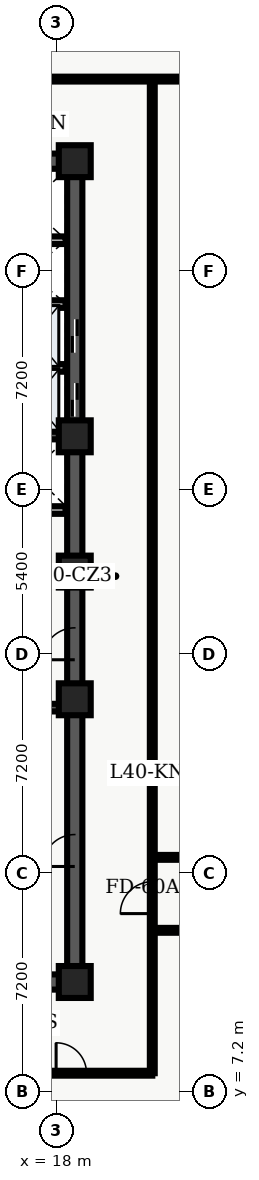
"""IFC4 building model, lengths in metres.
Left out: names, types, materials, properties, quantities, classifications, styles, units other than length and angle.
Written with IfcOpenShell. Run it as: python <this file> out.ifc"""

import sys

from ifc_helpers import new_model, entity, si_unit, converted_unit, direction, frame, origin_with_axes, origin_2d_with_axis, place, context, subcontext, project, spatial, polyline, rectangle, outline, extrude, element, fill, save


model = new_model("IFC4")
c1 = context("Model", 3, precision=1e-05, world=origin_with_axes(), true_north=direction((0.0, 1.0)))
c2 = subcontext(c1, "Body", "Model", "MODEL_VIEW")
j1 = project(units=[si_unit("LENGTHUNIT", "METRE"), converted_unit("PLANEANGLEUNIT", "DEGREE", entity("IfcPlaneAngleMeasure", 0.017), si_unit("PLANEANGLEUNIT", "RADIAN"), dimensions=[0, 0, 0, 0, 0, 0, 0])], contexts=[c1])
p1 = place(None, origin_with_axes())
s1 = spatial("IfcSite", under=j1, at=p1, CompositionType="ELEMENT")
p2 = place(p1, origin_with_axes())
s2 = spatial("IfcBuilding", under=s1, at=p2, CompositionType="ELEMENT")
p3 = place(p2, frame((0.0, 0.0, 164.1), z_axis=(0.0, 0.0, 1.0), x_axis=(1.0, 0.0, 0.0)))
s3 = spatial("IfcBuildingStorey", under=s2, at=p3, CompositionType="ELEMENT", Elevation=164.1)
p4 = place(p3, frame((11.4, 10.8, 0.0), z_axis=(0.0, 0.0, 1.0), x_axis=(1.0, 0.0, 0.0)))
e1 = element("IfcWall", 1, at=p4, inside=s3, PredefinedType="SHEAR", context=c2, shape_type="SweptSolid", body=[
    extrude(outline(polyline([(0.0, -0.25), (7.2, -0.25), (7.2, 0.25), (0.0, 0.25), (0.0, -0.25)])), origin_with_axes(), (0.0, 0.0, 1.0), 3.66),
])
p5 = place(p4, frame((2.625, 0.0, 0.0), z_axis=(0.0, 0.0, 1.0), x_axis=(1.0, 0.0, 0.0)))
e2 = element("IfcOpeningElement", 2, at=p5, cuts=e1, PredefinedType="OPENING", context=c2, shape_type="SweptSolid", body=[
    extrude(rectangle(XDim=1.05, YDim=0.52, at=origin_2d_with_axis()), origin_with_axes(), (0.0, 0.0, 1.0), 2.15),
])
p6 = place(p3, frame((11.4, 37.8, 0.0), z_axis=(0.0, 0.0, 1.0), x_axis=(1.0, 0.0, 0.0)))
e3 = element("IfcWall", 3, at=p6, inside=s3, PredefinedType="SHEAR", context=c2, shape_type="SweptSolid", body=[
    extrude(outline(polyline([(0.0, -0.25), (7.2, -0.25), (7.2, 0.25), (0.0, 0.25), (0.0, -0.25)])), origin_with_axes(), (0.0, 0.0, 1.0), 3.66),
])
p7 = place(p6, frame((2.625, 0.0, 0.0), z_axis=(0.0, 0.0, 1.0), x_axis=(1.0, 0.0, 0.0)))
e4 = element("IfcOpeningElement", 4, at=p7, cuts=e3, PredefinedType="OPENING", context=c2, shape_type="SweptSolid", body=[
    extrude(rectangle(XDim=1.05, YDim=0.52, at=origin_2d_with_axis()), origin_with_axes(), (0.0, 0.0, 1.0), 2.15),
])
p8 = place(p3, frame((18.6, 10.8, 0.0), z_axis=(0.0, 0.0, 1.0), x_axis=(0.0, 1.0, 0.0)))
e5 = element("IfcWall", 5, at=p8, inside=s3, PredefinedType="SHEAR", context=c2, shape_type="SweptSolid", body=[
    extrude(outline(polyline([(0.0, -0.25), (13.5, -0.25), (13.5, 0.25), (0.0, 0.25), (0.0, -0.25)])), origin_with_axes(), (0.0, 0.0, 1.0), 3.66),
])
p9 = place(p8, frame((11.125, 0.0, 0.0), z_axis=(0.0, 0.0, 1.0), x_axis=(1.0, 0.0, 0.0)))
e6 = element("IfcOpeningElement", 6, at=p9, cuts=e5, PredefinedType="OPENING", context=c2, shape_type="SweptSolid", body=[
    extrude(rectangle(XDim=1.05, YDim=0.52, at=origin_2d_with_axis()), origin_with_axes(), (0.0, 0.0, 1.0), 2.15),
])
p10 = place(p8, frame((4.325, 0.0, 0.0), z_axis=(0.0, 0.0, 1.0), x_axis=(1.0, 0.0, 0.0)))
e7 = element("IfcOpeningElement", 7, at=p10, cuts=e5, PredefinedType="OPENING", context=c2, shape_type="SweptSolid", body=[
    extrude(rectangle(XDim=1.05, YDim=0.52, at=origin_2d_with_axis()), origin_with_axes(), (0.0, 0.0, 1.0), 2.15),
])
p11 = place(p3, frame((18.6, 24.3, 0.0), z_axis=(0.0, 0.0, 1.0), x_axis=(0.0, 1.0, 0.0)))
e8 = element("IfcWall", 8, at=p11, inside=s3, PredefinedType="SHEAR", context=c2, shape_type="SweptSolid", body=[
    extrude(outline(polyline([(0.0, -0.25), (13.5, -0.25), (13.5, 0.25), (0.0, 0.25), (0.0, -0.25)])), origin_with_axes(), (0.0, 0.0, 1.0), 3.66),
])
p12 = place(p11, frame((5.65, 0.0, 0.0), z_axis=(0.0, 0.0, 1.0), x_axis=(1.0, 0.0, 0.0)))
e9 = element("IfcOpeningElement", 9, at=p12, cuts=e8, PredefinedType="OPENING", context=c2, shape_type="SweptSolid", body=[
    extrude(rectangle(XDim=1.1, YDim=0.52, at=origin_2d_with_axis()), origin_with_axes(), (0.0, 0.0, 1.0), 2.15),
])
p13 = place(p11, frame((7.75, 0.0, 0.0), z_axis=(0.0, 0.0, 1.0), x_axis=(1.0, 0.0, 0.0)))
e10 = element("IfcOpeningElement", 10, at=p13, cuts=e8, PredefinedType="OPENING", context=c2, shape_type="SweptSolid", body=[
    extrude(rectangle(XDim=1.1, YDim=0.52, at=origin_2d_with_axis()), origin_with_axes(), (0.0, 0.0, 1.0), 2.15),
])
for number, where, z_axis, x_axis in (
    (11, (11.65, 19.825, 0.0), (0.0, 0.0, 1.0), (1.0, 0.0, 0.0)),
    (12, (11.65, 28.775, 0.0), (0.0, 0.0, 1.0), (1.0, 0.0, 0.0)),
):
    element("IfcWall", number, at=place(p3, frame(where, z_axis=z_axis, x_axis=x_axis)), inside=s3, PredefinedType="SHEAR", context=c2, shape_type="SweptSolid", body=[
        extrude(outline(polyline([(0.0, -0.125), (6.7, -0.125), (6.7, 0.125), (0.0, 0.125), (0.0, -0.125)])), origin_with_axes(), (0.0, 0.0, 1.0), 3.66),
    ])
p14 = place(p3, frame((11.7, 24.1, 0.0), z_axis=(0.0, 0.0, 1.0), x_axis=(1.0, 0.0, 0.0)))
e13 = element("IfcWall", 13, at=p14, inside=s3, PredefinedType="SOLIDWALL", context=c2, shape_type="SweptSolid", body=[
    extrude(outline(polyline([(0.0, -0.125), (6.6, -0.125), (6.6, 0.125), (0.0, 0.125), (0.0, -0.125)])), origin_with_axes(), (0.0, 0.0, 1.0), 2.7),
])
p15 = place(p14, frame((3.75, 0.0, 0.0), z_axis=(0.0, 0.0, 1.0), x_axis=(1.0, 0.0, 0.0)))
e14 = element("IfcOpeningElement", 14, at=p15, cuts=e13, PredefinedType="OPENING", context=c2, shape_type="SweptSolid", body=[
    extrude(rectangle(XDim=0.9, YDim=0.27, at=origin_2d_with_axis()), origin_with_axes(), (0.0, 0.0, 1.0), 2.15),
])
p16 = place(p3, frame((11.7, 26.325, 0.0), z_axis=(0.0, 0.0, 1.0), x_axis=(1.0, 0.0, 0.0)))
e15 = element("IfcWall", 15, at=p16, inside=s3, PredefinedType="SOLIDWALL", context=c2, shape_type="SweptSolid", body=[
    extrude(outline(polyline([(0.0, -0.125), (6.6, -0.125), (6.6, 0.125), (0.0, 0.125), (0.0, -0.125)])), origin_with_axes(), (0.0, 0.0, 1.0), 2.7),
])
p17 = place(p16, frame((3.5, 0.0, 0.0), z_axis=(0.0, 0.0, 1.0), x_axis=(1.0, 0.0, 0.0)))
e16 = element("IfcOpeningElement", 16, at=p17, cuts=e15, PredefinedType="OPENING", context=c2, shape_type="SweptSolid", body=[
    extrude(rectangle(XDim=0.9, YDim=0.27, at=origin_2d_with_axis()), origin_with_axes(), (0.0, 0.0, 1.0), 2.15),
])
for number, where, z_axis, x_axis in (
    (17, (18.6, 10.8, 0.0), (0.0, 0.0, 1.0), (1.0, 0.0, 0.0)),
    (18, (18.6, 20.1, 0.0), (0.0, 0.0, 1.0), (1.0, 0.0, 0.0)),
    (19, (18.6, 24.3, 0.0), (0.0, 0.0, 1.0), (1.0, 0.0, 0.0)),
    (20, (18.6, 28.75, 0.0), (0.0, 0.0, 1.0), (1.0, 0.0, 0.0)),
    (21, (18.6, 37.8, 0.0), (0.0, 0.0, 1.0), (1.0, 0.0, 0.0)),
):
    element("IfcColumn", number, at=place(p3, frame(where, z_axis=z_axis, x_axis=x_axis)), inside=s3, PredefinedType="COLUMN", context=c2, shape_type="SweptSolid", body=[
        extrude(rectangle(XDim=1.05, YDim=1.05, at=origin_2d_with_axis()), origin_with_axes(), (0.0, 0.0, 1.0), 3.9),
    ])
for number, where, z_axis, x_axis in (
    (22, (15.84, 31.0, 0.0), (0.0, 0.0, 1.0), (1.0, 0.0, 0.0)),
    (23, (15.84, 33.1, 0.0), (0.0, 0.0, 1.0), (1.0, 0.0, 0.0)),
    (24, (15.84, 35.2, 0.0), (0.0, 0.0, 1.0), (1.0, 0.0, 0.0)),
):
    element("IfcWall", number, at=place(p3, frame(where, z_axis=z_axis, x_axis=x_axis)), inside=s3, PredefinedType="SOLIDWALL", context=c2, shape_type="SweptSolid", body=[
        extrude(outline(polyline([(0.0, -0.125), (2.46, -0.125), (2.46, 0.125), (0.0, 0.125), (0.0, -0.125)])), origin_with_axes(), (0.0, 0.0, 1.0), 2.7),
    ])
p18 = place(p3, frame((2.6, 7.8, 0.0), z_axis=(0.0, 0.0, 1.0), x_axis=(1.0, 0.0, 0.0)))
e25 = element("IfcWall", 25, at=p18, inside=s3, PredefinedType="PARTITIONING", context=c2, shape_type="SweptSolid", body=[
    extrude(outline(polyline([(0.0, -0.08), (18.55, -0.08), (18.55, 0.08), (0.0, 0.08), (0.0, -0.08)])), origin_with_axes(), (0.0, 0.0, 1.0), 2.7),
])
p19 = place(p18, frame((3.215, 0.0, 0.0), z_axis=(0.0, 0.0, 1.0), x_axis=(1.0, 0.0, 0.0)))
e26 = element("IfcOpeningElement", 26, at=p19, cuts=e25, PredefinedType="OPENING", context=c2, shape_type="SweptSolid", body=[
    extrude(rectangle(XDim=1.2, YDim=0.18, at=origin_2d_with_axis()), origin_with_axes(), (0.0, 0.0, 1.0), 2.2),
])
p20 = place(p18, frame((11.107, 0.0, 0.0), z_axis=(0.0, 0.0, 1.0), x_axis=(1.0, 0.0, 0.0)))
e27 = element("IfcOpeningElement", 27, at=p20, cuts=e25, PredefinedType="OPENING", context=c2, shape_type="SweptSolid", body=[
    extrude(rectangle(XDim=1.0, YDim=0.18, at=origin_2d_with_axis()), origin_with_axes(), (0.0, 0.0, 1.0), 2.15),
])
p21 = place(p18, frame((15.886, 0.0, 0.0), z_axis=(0.0, 0.0, 1.0), x_axis=(1.0, 0.0, 0.0)))
e28 = element("IfcOpeningElement", 28, at=p21, cuts=e25, PredefinedType="OPENING", context=c2, shape_type="SweptSolid", body=[
    extrude(rectangle(XDim=1.0, YDim=0.18, at=origin_2d_with_axis()), origin_with_axes(), (0.0, 0.0, 1.0), 2.15),
])
p22 = place(p3, frame((2.6, 40.5, 0.0), z_axis=(0.0, 0.0, 1.0), x_axis=(1.0, 0.0, 0.0)))
e29 = element("IfcWall", 29, at=p22, inside=s3, PredefinedType="PARTITIONING", context=c2, shape_type="SweptSolid", body=[
    extrude(outline(polyline([(0.0, -0.08), (20.884, -0.08), (20.884, 0.08), (0.0, 0.08), (0.0, -0.08)])), origin_with_axes(), (0.0, 0.0, 1.0), 2.7),
])
p23 = place(p22, frame((4.395, 0.0, 0.0), z_axis=(0.0, 0.0, 1.0), x_axis=(1.0, 0.0, 0.0)))
e30 = element("IfcOpeningElement", 30, at=p23, cuts=e29, PredefinedType="OPENING", context=c2, shape_type="SweptSolid", body=[
    extrude(rectangle(XDim=1.2, YDim=0.18, at=origin_2d_with_axis()), origin_with_axes(), (0.0, 0.0, 1.0), 2.2),
])
p24 = place(p22, frame((13.16, 0.0, 0.0), z_axis=(0.0, 0.0, 1.0), x_axis=(1.0, 0.0, 0.0)))
e31 = element("IfcOpeningElement", 31, at=p24, cuts=e29, PredefinedType="OPENING", context=c2, shape_type="SweptSolid", body=[
    extrude(rectangle(XDim=1.0, YDim=0.18, at=origin_2d_with_axis()), origin_with_axes(), (0.0, 0.0, 1.0), 2.15),
])
p25 = place(p3, frame((21.15, 7.8, 0.0), z_axis=(0.0, 0.0, 1.0), x_axis=(0.0, 1.0, 0.0)))
e32 = element("IfcWall", 32, at=p25, inside=s3, PredefinedType="PARTITIONING", context=c2, shape_type="SweptSolid", body=[
    extrude(outline(polyline([(0.0, -0.08), (32.7, -0.08), (32.7, 0.08), (0.0, 0.08), (0.0, -0.08)])), origin_with_axes(), (0.0, 0.0, 1.0), 2.7),
])
p26 = place(p25, frame((5.775, 0.0, 0.0), z_axis=(0.0, 0.0, 1.0), x_axis=(1.0, 0.0, 0.0)))
e33 = element("IfcOpeningElement", 33, at=p26, cuts=e32, PredefinedType="OPENING", context=c2, shape_type="SweptSolid", body=[
    extrude(rectangle(XDim=1.05, YDim=0.18, at=origin_2d_with_axis()), origin_with_axes(), (0.0, 0.0, 1.0), 2.15),
])
p27 = place(p3, frame((21.15, 12.5, 0.0), z_axis=(0.0, 0.0, 1.0), x_axis=(1.0, 0.0, 0.0)))
e34 = element("IfcWall", 34, at=p27, inside=s3, PredefinedType="PARTITIONING", context=c2, shape_type="SweptSolid", body=[
    extrude(outline(polyline([(0.0, -0.08), (15.2, -0.08), (15.2, 0.08), (0.0, 0.08), (0.0, -0.08)])), origin_with_axes(), (0.0, 0.0, 1.0), 2.7),
])
p28 = place(p27, frame((3.583, 0.0, 0.0), z_axis=(0.0, 0.0, 1.0), x_axis=(1.0, 0.0, 0.0)))
e35 = element("IfcOpeningElement", 35, at=p28, cuts=e34, PredefinedType="OPENING", context=c2, shape_type="SweptSolid", body=[
    extrude(rectangle(XDim=1.0, YDim=0.18, at=origin_2d_with_axis()), origin_with_axes(), (0.0, 0.0, 1.0), 2.15),
])
p29 = place(p27, frame((11.053, 0.0, 0.0), z_axis=(0.0, 0.0, 1.0), x_axis=(1.0, 0.0, 0.0)))
e36 = element("IfcOpeningElement", 36, at=p29, cuts=e34, PredefinedType="OPENING", context=c2, shape_type="SweptSolid", body=[
    extrude(rectangle(XDim=1.2, YDim=0.18, at=origin_2d_with_axis()), origin_with_axes(), (0.0, 0.0, 1.0), 2.2),
])
p30 = place(p3, frame((21.15, 14.9, 0.0), z_axis=(0.0, 0.0, 1.0), x_axis=(1.0, 0.0, 0.0)))
e37 = element("IfcWall", 37, at=p30, inside=s3, PredefinedType="PARTITIONING", context=c2, shape_type="SweptSolid", body=[
    extrude(outline(polyline([(0.0, -0.08), (15.2, -0.08), (15.2, 0.08), (0.0, 0.08), (0.0, -0.08)])), origin_with_axes(), (0.0, 0.0, 1.0), 2.7),
])
p31 = place(p30, frame((1.758, 0.0, 0.0), z_axis=(0.0, 0.0, 1.0), x_axis=(1.0, 0.0, 0.0)))
e38 = element("IfcOpeningElement", 38, at=p31, cuts=e37, PredefinedType="OPENING", context=c2, shape_type="SweptSolid", body=[
    extrude(rectangle(XDim=1.0, YDim=0.18, at=origin_2d_with_axis()), origin_with_axes(), (0.0, 0.0, 1.0), 2.15),
])
p32 = place(p30, frame((4.893, 0.0, 0.0), z_axis=(0.0, 0.0, 1.0), x_axis=(1.0, 0.0, 0.0)))
e39 = element("IfcOpeningElement", 39, at=p32, cuts=e37, PredefinedType="OPENING", context=c2, shape_type="SweptSolid", body=[
    extrude(rectangle(XDim=1.0, YDim=0.18, at=origin_2d_with_axis()), origin_with_axes(), (0.0, 0.0, 1.0), 2.15),
])
p33 = place(p30, frame((8.555, 0.0, 0.0), z_axis=(0.0, 0.0, 1.0), x_axis=(1.0, 0.0, 0.0)))
e40 = element("IfcOpeningElement", 40, at=p33, cuts=e37, PredefinedType="OPENING", context=c2, shape_type="SweptSolid", body=[
    extrude(rectangle(XDim=1.0, YDim=0.18, at=origin_2d_with_axis()), origin_with_axes(), (0.0, 0.0, 1.0), 2.15),
])
p34 = place(p30, frame((12.889, 0.0, 0.0), z_axis=(0.0, 0.0, 1.0), x_axis=(1.0, 0.0, 0.0)))
e41 = element("IfcOpeningElement", 41, at=p34, cuts=e37, PredefinedType="OPENING", context=c2, shape_type="SweptSolid", body=[
    extrude(rectangle(XDim=1.0, YDim=0.18, at=origin_2d_with_axis()), origin_with_axes(), (0.0, 0.0, 1.0), 2.15),
])
p35 = place(p11, frame((5.65, 0.0, 0.0), z_axis=(0.0, 0.0, 1.0), x_axis=(1.0, 0.0, 0.0)))
e42 = element("IfcDoor", 42, at=p35, inside=s3, OperationType="SLIDING_TO_LEFT", PredefinedType="DOOR", context=c2, shape_type="SweptSolid", body=[
    extrude(rectangle(XDim=1.1, YDim=0.09, at=origin_2d_with_axis()), origin_with_axes(), (0.0, 0.0, 1.0), 2.15),
])
fill(e9, e42)
p36 = place(p11, frame((7.75, 0.0, 0.0), z_axis=(0.0, 0.0, 1.0), x_axis=(1.0, 0.0, 0.0)))
e43 = element("IfcDoor", 43, at=p36, inside=s3, OperationType="SLIDING_TO_RIGHT", PredefinedType="DOOR", context=c2, shape_type="SweptSolid", body=[
    extrude(rectangle(XDim=1.1, YDim=0.09, at=origin_2d_with_axis()), origin_with_axes(), (0.0, 0.0, 1.0), 2.15),
])
fill(e10, e43)
p37 = place(p8, frame((11.125, 0.0, 0.0), z_axis=(0.0, 0.0, 1.0), x_axis=(1.0, 0.0, 0.0)))
e44 = element("IfcDoor", 44, at=p37, inside=s3, OperationType="SINGLE_SWING_LEFT", PredefinedType="DOOR", context=c2, shape_type="SweptSolid", body=[
    extrude(rectangle(XDim=1.05, YDim=0.09, at=origin_2d_with_axis()), origin_with_axes(), (0.0, 0.0, 1.0), 2.15),
])
fill(e6, e44)
p38 = place(p8, frame((4.325, 0.0, 0.0), z_axis=(0.0, 0.0, 1.0), x_axis=(1.0, 0.0, 0.0)))
e45 = element("IfcDoor", 45, at=p38, inside=s3, OperationType="SINGLE_SWING_LEFT", PredefinedType="DOOR", context=c2, shape_type="SweptSolid", body=[
    extrude(rectangle(XDim=1.05, YDim=0.09, at=origin_2d_with_axis()), origin_with_axes(), (0.0, 0.0, 1.0), 2.15),
])
fill(e7, e45)
p39 = place(p18, frame((15.886, 0.0, 0.0), z_axis=(0.0, 0.0, 1.0), x_axis=(1.0, 0.0, 0.0)))
e46 = element("IfcDoor", 46, at=p39, inside=s3, OperationType="SINGLE_SWING_LEFT", PredefinedType="DOOR", context=c2, shape_type="SweptSolid", body=[
    extrude(rectangle(XDim=1.0, YDim=0.09, at=origin_2d_with_axis()), origin_with_axes(), (0.0, 0.0, 1.0), 2.15),
])
fill(e28, e46)
p40 = place(p25, frame((5.775, 0.0, 0.0), z_axis=(0.0, 0.0, 1.0), x_axis=(1.0, 0.0, 0.0)))
e47 = element("IfcDoor", 47, at=p40, inside=s3, OperationType="SINGLE_SWING_LEFT", PredefinedType="DOOR", context=c2, shape_type="SweptSolid", body=[
    extrude(rectangle(XDim=1.05, YDim=0.09, at=origin_2d_with_axis()), origin_with_axes(), (0.0, 0.0, 1.0), 2.15),
])
fill(e33, e47)
save(model, sys.argv[1])
